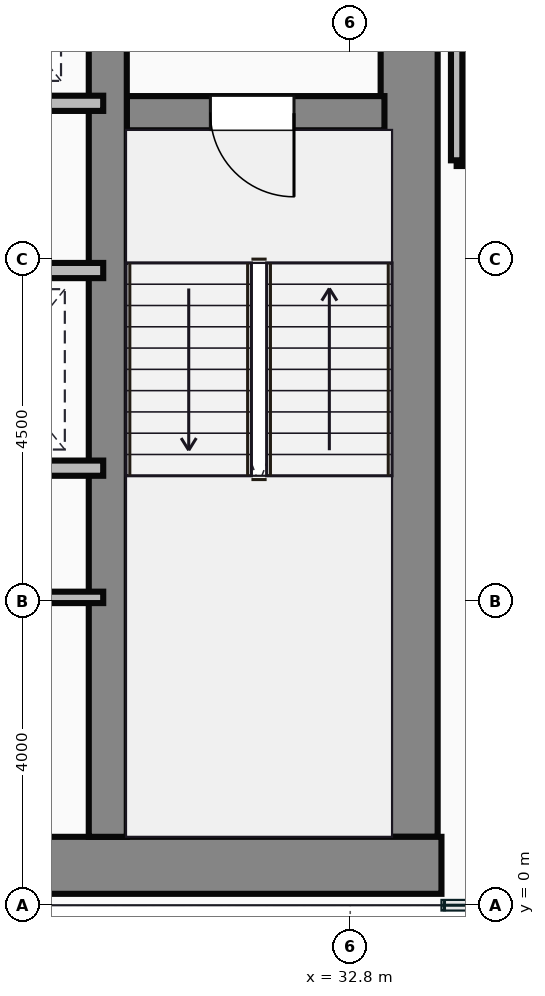
"""IFC4 building model, lengths in metres.
Left out: names, types, materials, properties, quantities, classifications, styles, units other than length and angle.
Written with IfcOpenShell. Run it as: python <this file> out.ifc"""

import sys

from ifc_helpers import new_model, si_unit, direction, frame, frame_2d, origin, place, context, subcontext, project, spatial, rectangle, extrude, source, transform, mapped, element, fill, save


model = new_model("IFC4")
c1 = context("Model", 3, precision=1e-05, world=origin(), true_north=direction((0.0, 1.0)))
c2 = subcontext(c1, "Body", "Model", "MODEL_VIEW")
j1 = project(units=[si_unit("LENGTHUNIT", "METRE"), si_unit("PLANEANGLEUNIT", "RADIAN")], contexts=[c1])
p1 = place(None, origin())
s1 = spatial("IfcSite", under=j1, at=p1, CompositionType="ELEMENT")
p2 = place(p1, origin())
s2 = spatial("IfcBuilding", under=s1, at=p2, CompositionType="ELEMENT")
p3 = place(p2, frame((0.0, 0.0, 117.85)))
s3 = spatial("IfcBuildingStorey", under=s2, at=p3, CompositionType="ELEMENT", Elevation=117.85)
m1 = source(origin(), c2, "Body", "SweptSolid", [
    extrude(rectangle(XDim=29.5, YDim=0.75, at=frame_2d((14.75, 0.0))), origin(), (0.0, 0.0, 1.0), 3.65),
])
p4 = place(p3, frame((4.5, 0.525, 0.0), z_axis=(0.0, 0.0, 1.0), x_axis=(1.0, 0.0, 0.0)))
e1 = element("IfcWall", 1, at=p4, inside=s3, PredefinedType="SHEAR", context=c2, shape_type="MappedRepresentation", body=[
    mapped(m1, transform((0.0, 0.0, 0.0))),
])
m2 = source(origin(), c2, "Body", "SweptSolid", [
    extrude(rectangle(XDim=13.1, YDim=0.75, at=frame_2d((6.55, 0.0))), origin(), (0.0, 0.0, 1.0), 3.65),
])
p5 = place(p3, frame((33.575, 0.9, 0.0), z_axis=(0.0, 0.0, 1.0), x_axis=(0.0, 1.0, 0.0)))
e2 = element("IfcWall", 2, at=p5, inside=s3, PredefinedType="SHEAR", context=c2, shape_type="MappedRepresentation", body=[
    mapped(m2, transform((0.0, 0.0, 0.0))),
])
m3 = source(origin(), c2, "Body", "SweptSolid", [
    extrude(rectangle(XDim=12.35, YDim=0.5, at=frame_2d((6.175, 0.0))), origin(), (0.0, 0.0, 1.0), 3.65),
])
p6 = place(p3, frame((29.61, 0.9, 0.0), z_axis=(0.0, 0.0, 1.0), x_axis=(0.0, 1.0, 0.0)))
e3 = element("IfcWall", 3, at=p6, inside=s3, PredefinedType="SHEAR", context=c2, shape_type="MappedRepresentation", body=[
    mapped(m3, transform((0.0, 0.0, 0.0))),
])
m4 = source(origin(), c2, "Body", "SweptSolid", [
    extrude(rectangle(XDim=3.39, YDim=0.45, at=frame_2d((1.695, 0.0))), origin(), (0.0, 0.0, 1.0), 3.65),
])
p7 = place(p3, frame((29.86, 10.42, 0.0), z_axis=(0.0, 0.0, 1.0), x_axis=(1.0, 0.0, 0.0)))
e4 = element("IfcWall", 4, at=p7, inside=s3, PredefinedType="SHEAR", context=c2, shape_type="MappedRepresentation", body=[
    mapped(m4, transform((0.0, 0.0, 0.0))),
])
p8 = place(p7, frame((1.1, 0.0, 0.0)))
e5 = element("IfcOpeningElement", 5, at=p8, cuts=e4, PredefinedType="OPENING", context=c2, shape_type="SweptSolid", body=[
    extrude(rectangle(XDim=1.1, YDim=2.15, at=frame_2d((0.55, 1.075))), frame((0.0, 0.235, 0.0), z_axis=(0.0, -1.0, 0.0), x_axis=(1.0, 0.0, 0.0)), (0.0, 0.0, 1.0), 0.47),
])
m5 = source(origin(), c2, "Body", "SweptSolid", [
    extrude(rectangle(XDim=8.8, YDim=0.2, at=frame_2d((4.4, 0.0))), origin(), (0.0, 0.0, 1.0), 3.4),
])
p9 = place(p3, frame((20.75, 10.55, 0.0), z_axis=(0.0, 0.0, 1.0), x_axis=(1.0, 0.0, 0.0)))
e6 = element("IfcWall", 6, at=p9, inside=s3, PredefinedType="PARTITIONING", context=c2, shape_type="MappedRepresentation", body=[
    mapped(m5, transform((0.0, 0.0, 0.0))),
])
m6 = source(origin(), c2, "Body", "SweptSolid", [
    extrude(rectangle(XDim=4.55, YDim=0.2, at=frame_2d((2.275, 0.0))), origin(), (0.0, 0.0, 1.0), 3.4),
])
for number, where, z_axis, x_axis in (
    (7, (25.0, 8.35, 0.0), (0.0, 0.0, 1.0), (1.0, 0.0, 0.0)),
    (8, (25.0, 5.75, 0.0), (0.0, 0.0, 1.0), (1.0, 0.0, 0.0)),
):
    element("IfcWall", number, at=place(p3, frame(where, z_axis=z_axis, x_axis=x_axis)), inside=s3, PredefinedType="PARTITIONING", context=c2, shape_type="MappedRepresentation", body=[
        mapped(m6, transform((0.0, 0.0, 0.0))),
    ])
m7 = source(origin(), c2, "Body", "SweptSolid", [
    extrude(rectangle(XDim=4.55, YDim=0.15, at=frame_2d((2.275, 0.0))), origin(), (0.0, 0.0, 1.0), 3.4),
])
p10 = place(p3, frame((25.0, 4.05, 0.0), z_axis=(0.0, 0.0, 1.0), x_axis=(1.0, 0.0, 0.0)))
e9 = element("IfcWall", 9, at=p10, inside=s3, PredefinedType="PARTITIONING", context=c2, shape_type="MappedRepresentation", body=[
    mapped(m7, transform((0.0, 0.0, 0.0))),
])
m8 = source(origin(), c2, "Body", "SweptSolid", [
    extrude(rectangle(XDim=4.8, YDim=0.15, at=frame_2d((2.4, 0.0))), origin(), (0.0, 0.0, 1.0), 3.4),
])
p11 = place(p3, frame((34.2, 9.8, 0.0), z_axis=(0.0, 0.0, 1.0), x_axis=(1.0, 0.0, 0.0)))
e10 = element("IfcWall", 10, at=p11, inside=s3, PredefinedType="PARTITIONING", context=c2, shape_type="MappedRepresentation", body=[
    mapped(m8, transform((0.0, 0.0, 0.0))),
])
m9 = source(origin(), c2, "Body", "SweptSolid", [
    extrude(rectangle(XDim=4.18, YDim=0.15, at=frame_2d((2.09, 0.0))), origin(), (0.0, 0.0, 1.0), 3.4),
])
p12 = place(p3, frame((34.2, 9.8, 0.0), z_axis=(0.0, 0.0, 1.0), x_axis=(0.0, 1.0, 0.0)))
e11 = element("IfcWall", 11, at=p12, inside=s3, PredefinedType="PARTITIONING", context=c2, shape_type="MappedRepresentation", body=[
    mapped(m9, transform((0.0, 0.0, 0.0))),
])
m10 = source(origin(), c2, "Body", "SweptSolid", [
    extrude(rectangle(XDim=1.1, YDim=2.15, at=frame_2d((0.55, 1.075))), frame((0.0, 0.025, 0.0), z_axis=(0.0, -1.0, 0.0), x_axis=(1.0, 0.0, 0.0)), (0.0, 0.0, 1.0), 0.05),
])
p13 = place(p8, frame((1.1, 0.0, 0.0), z_axis=(0.0, 0.0, 1.0), x_axis=(-1.0, 0.0, 0.0)))
e12 = element("IfcDoor", 12, at=p13, inside=s3, OperationType="SINGLE_SWING_RIGHT", PredefinedType="DOOR", context=c2, shape_type="MappedRepresentation", body=[
    mapped(m10, transform((0.0, 0.0, 0.0))),
])
fill(e5, e12)
save(model, sys.argv[1])
